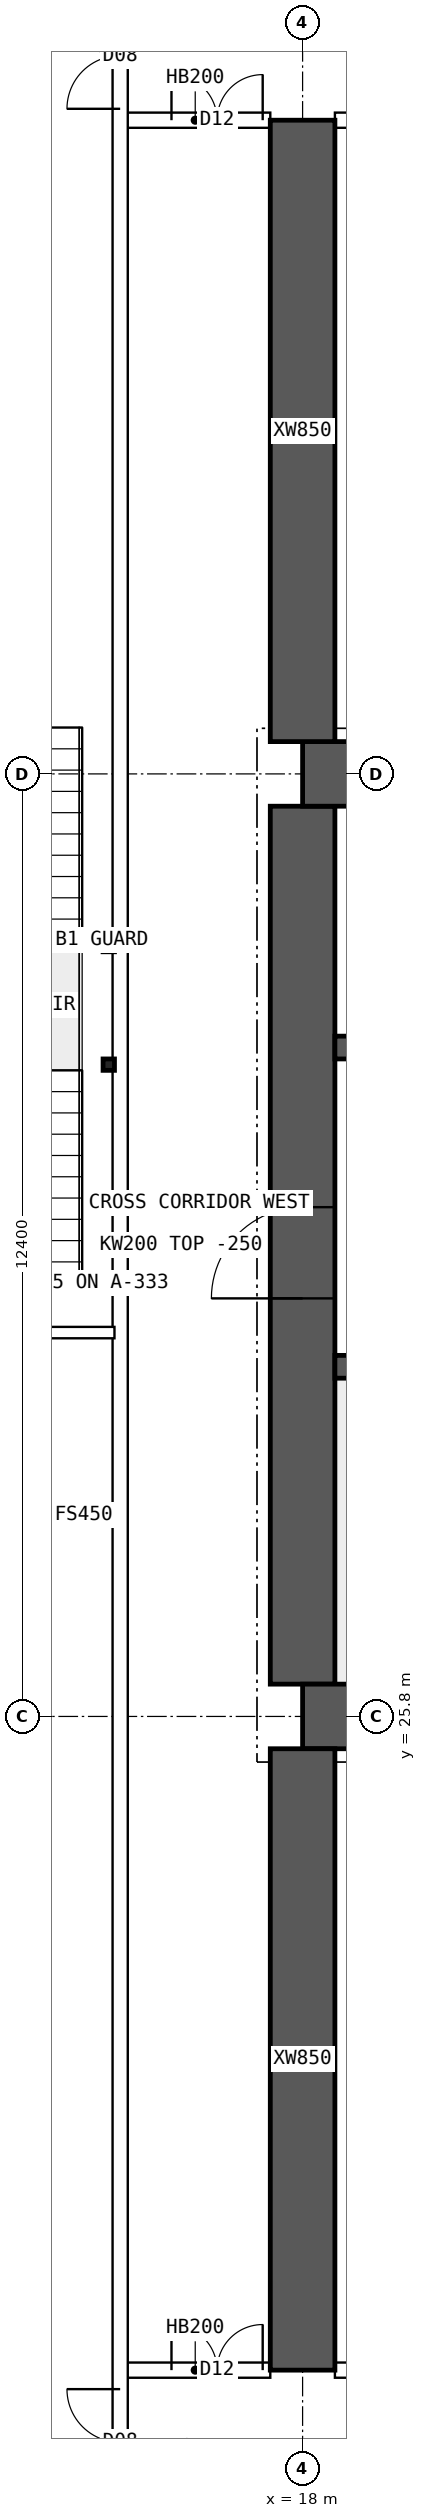
"""IFC4 building model, lengths in metres.
Left out: names, types, materials, properties, quantities, classifications, styles, units other than length and angle.
Written with IfcOpenShell. Run it as: python <this file> out.ifc"""

import sys

from ifc_helpers import new_model, si_unit, direction, frame, frame_2d, origin, origin_2d, place, context, subcontext, project, spatial, polyline, rectangle, hollow_rectangle, outline, extrude, element, fill, save


model = new_model("IFC4")
c1 = context("Model", 3, precision=1e-05, world=origin(), true_north=direction((0.0, 1.0)))
c2 = subcontext(c1, "Body", "Model", "MODEL_VIEW")
j1 = project(units=[si_unit("LENGTHUNIT", "METRE"), si_unit("PLANEANGLEUNIT", "RADIAN")], contexts=[c1])
p1 = place(None, origin())
s1 = spatial("IfcSite", under=j1, at=p1, CompositionType="ELEMENT")
p2 = place(p1, origin())
s2 = spatial("IfcBuilding", under=s1, at=p2, CompositionType="ELEMENT")
p3 = place(p2, frame((0.0, 0.0, 178.6)))
s3 = spatial("IfcBuildingStorey", under=s2, at=p3, CompositionType="ELEMENT", Elevation=178.6)
for number, where, z_axis, x_axis in (
    (1, (18.0, 25.8, 0.0), (0.0, 0.0, 1.0), (1.0, 0.0, 0.0)),
    (2, (18.0, 38.2, 0.0), (0.0, 0.0, 1.0), (1.0, 0.0, 0.0)),
):
    element("IfcWall", number, at=place(p3, frame(where, z_axis=z_axis, x_axis=x_axis)), inside=s3, PredefinedType="SHEAR", context=c2, shape_type="SweptSolid", body=[
        extrude(rectangle(XDim=48.0, YDim=0.85, at=frame_2d((24.0, 0.0))), origin(), (0.0, 0.0, 1.0), 3.75),
    ])
p4 = place(p3, frame((18.0, 26.225, 0.0), z_axis=(0.0, 0.0, 1.0), x_axis=(0.0, 1.0, 0.0)))
e3 = element("IfcWall", 3, at=p4, inside=s3, PredefinedType="SHEAR", context=c2, shape_type="SweptSolid", body=[
    extrude(rectangle(XDim=11.55, YDim=0.85, at=frame_2d((5.775, 0.0))), origin(), (0.0, 0.0, 1.0), 3.75),
])
p5 = place(p4, frame((5.075, 0.0, 0.0)))
e4 = element("IfcOpeningElement", 4, at=p5, cuts=e3, PredefinedType="OPENING", context=c2, shape_type="SweptSolid", body=[
    extrude(rectangle(XDim=1.2, YDim=2.1, at=frame_2d((0.6, 1.05))), frame((0.0, 0.435, 0.0), z_axis=(0.0, -1.0, 0.0), x_axis=(1.0, 0.0, 0.0)), (0.0, 0.0, 1.0), 0.87),
])
p6 = place(p3, frame((18.425, 30.4, 0.0), z_axis=(0.0, 0.0, 1.0), x_axis=(1.0, 0.0, 0.0)))
e5 = element("IfcWall", 5, at=p6, inside=s3, PredefinedType="SHEAR", context=c2, shape_type="SweptSolid", body=[
    extrude(rectangle(XDim=47.15, YDim=0.3, at=frame_2d((23.575, 0.0))), origin(), (0.0, 0.0, 1.0), 3.75),
])
p7 = place(p6, frame((0.4, 0.0, 0.0)))
e6 = element("IfcOpeningElement", 6, at=p7, cuts=e5, PredefinedType="OPENING", context=c2, shape_type="SweptSolid", body=[
    extrude(rectangle(XDim=1.0, YDim=2.1, at=frame_2d((0.5, 1.05))), frame((0.0, 0.16, 0.0), z_axis=(0.0, -1.0, 0.0), x_axis=(1.0, 0.0, 0.0)), (0.0, 0.0, 1.0), 0.32),
])
p8 = place(p6, frame((45.75, 0.0, 0.0)))
e7 = element("IfcOpeningElement", 7, at=p8, cuts=e5, PredefinedType="OPENING", context=c2, shape_type="SweptSolid", body=[
    extrude(rectangle(XDim=1.0, YDim=2.1, at=frame_2d((0.5, 1.05))), frame((0.0, 0.16, 0.0), z_axis=(0.0, -1.0, 0.0), x_axis=(1.0, 0.0, 0.0)), (0.0, 0.0, 1.0), 0.32),
])
p9 = place(p6, frame((8.325, 0.0, 0.0)))
e8 = element("IfcOpeningElement", 8, at=p9, cuts=e5, PredefinedType="OPENING", context=c2, shape_type="SweptSolid", body=[
    extrude(rectangle(XDim=1.1, YDim=2.1, at=frame_2d((0.55, 1.05))), frame((0.0, 0.16, 0.0), z_axis=(0.0, -1.0, 0.0), x_axis=(1.0, 0.0, 0.0)), (0.0, 0.0, 1.0), 0.32),
])
p10 = place(p6, frame((10.925, 0.0, 0.0)))
e9 = element("IfcOpeningElement", 9, at=p10, cuts=e5, PredefinedType="OPENING", context=c2, shape_type="SweptSolid", body=[
    extrude(rectangle(XDim=1.1, YDim=2.1, at=frame_2d((0.55, 1.05))), frame((0.0, 0.16, 0.0), z_axis=(0.0, -1.0, 0.0), x_axis=(1.0, 0.0, 0.0)), (0.0, 0.0, 1.0), 0.32),
])
p11 = place(p6, frame((13.525, 0.0, 0.0)))
e10 = element("IfcOpeningElement", 10, at=p11, cuts=e5, PredefinedType="OPENING", context=c2, shape_type="SweptSolid", body=[
    extrude(rectangle(XDim=1.1, YDim=2.1, at=frame_2d((0.55, 1.05))), frame((0.0, 0.16, 0.0), z_axis=(0.0, -1.0, 0.0), x_axis=(1.0, 0.0, 0.0)), (0.0, 0.0, 1.0), 0.32),
])
p12 = place(p6, frame((16.125, 0.0, 0.0)))
e11 = element("IfcOpeningElement", 11, at=p12, cuts=e5, PredefinedType="OPENING", context=c2, shape_type="SweptSolid", body=[
    extrude(rectangle(XDim=1.1, YDim=2.1, at=frame_2d((0.55, 1.05))), frame((0.0, 0.16, 0.0), z_axis=(0.0, -1.0, 0.0), x_axis=(1.0, 0.0, 0.0)), (0.0, 0.0, 1.0), 0.32),
])
p13 = place(p6, frame((18.9, 0.0, 0.0)))
e12 = element("IfcOpeningElement", 12, at=p13, cuts=e5, PredefinedType="OPENING", context=c2, shape_type="SweptSolid", body=[
    extrude(rectangle(XDim=0.9, YDim=2.1, at=frame_2d((0.45, 1.05))), frame((0.0, 0.16, 0.0), z_axis=(0.0, -1.0, 0.0), x_axis=(1.0, 0.0, 0.0)), (0.0, 0.0, 1.0), 0.32),
])
p14 = place(p6, frame((30.192, 0.0, 0.0)))
e13 = element("IfcOpeningElement", 13, at=p14, cuts=e5, PredefinedType="OPENING", context=c2, shape_type="SweptSolid", body=[
    extrude(rectangle(XDim=1.1, YDim=2.1, at=frame_2d((0.55, 1.05))), frame((0.0, 0.16, 0.0), z_axis=(0.0, -1.0, 0.0), x_axis=(1.0, 0.0, 0.0)), (0.0, 0.0, 1.0), 0.32),
])
p15 = place(p6, frame((33.725, 0.0, 0.0)))
e14 = element("IfcOpeningElement", 14, at=p15, cuts=e5, PredefinedType="OPENING", context=c2, shape_type="SweptSolid", body=[
    extrude(rectangle(XDim=1.1, YDim=2.1, at=frame_2d((0.55, 1.05))), frame((0.0, 0.16, 0.0), z_axis=(0.0, -1.0, 0.0), x_axis=(1.0, 0.0, 0.0)), (0.0, 0.0, 1.0), 0.32),
])
p16 = place(p6, frame((37.258, 0.0, 0.0)))
e15 = element("IfcOpeningElement", 15, at=p16, cuts=e5, PredefinedType="OPENING", context=c2, shape_type="SweptSolid", body=[
    extrude(rectangle(XDim=1.1, YDim=2.1, at=frame_2d((0.55, 1.05))), frame((0.0, 0.16, 0.0), z_axis=(0.0, -1.0, 0.0), x_axis=(1.0, 0.0, 0.0)), (0.0, 0.0, 1.0), 0.32),
])
p17 = place(p3, frame((18.425, 34.6, 0.0), z_axis=(0.0, 0.0, 1.0), x_axis=(1.0, 0.0, 0.0)))
e16 = element("IfcWall", 16, at=p17, inside=s3, PredefinedType="SHEAR", context=c2, shape_type="SweptSolid", body=[
    extrude(rectangle(XDim=47.15, YDim=0.3, at=frame_2d((23.575, 0.0))), origin(), (0.0, 0.0, 1.0), 3.75),
])
p18 = place(p17, frame((0.9, 0.0, 0.0)))
e17 = element("IfcOpeningElement", 17, at=p18, cuts=e16, PredefinedType="OPENING", context=c2, shape_type="SweptSolid", body=[
    extrude(rectangle(XDim=1.1, YDim=2.1, at=frame_2d((0.55, 1.05))), frame((0.0, 0.16, 0.0), z_axis=(0.0, -1.0, 0.0), x_axis=(1.0, 0.0, 0.0)), (0.0, 0.0, 1.0), 0.32),
])
p19 = place(p17, frame((45.15, 0.0, 0.0)))
e18 = element("IfcOpeningElement", 18, at=p19, cuts=e16, PredefinedType="OPENING", context=c2, shape_type="SweptSolid", body=[
    extrude(rectangle(XDim=1.1, YDim=2.1, at=frame_2d((0.55, 1.05))), frame((0.0, 0.16, 0.0), z_axis=(0.0, -1.0, 0.0), x_axis=(1.0, 0.0, 0.0)), (0.0, 0.0, 1.0), 0.32),
])
p20 = place(p17, frame((4.175, 0.0, 0.0)))
e19 = element("IfcOpeningElement", 19, at=p20, cuts=e16, PredefinedType="OPENING", context=c2, shape_type="SweptSolid", body=[
    extrude(rectangle(XDim=0.9, YDim=2.1, at=frame_2d((0.45, 1.05))), frame((0.0, 0.16, 0.0), z_axis=(0.0, -1.0, 0.0), x_axis=(1.0, 0.0, 0.0)), (0.0, 0.0, 1.0), 0.32),
])
p21 = place(p17, frame((42.075, 0.0, 0.0)))
e20 = element("IfcOpeningElement", 20, at=p21, cuts=e16, PredefinedType="OPENING", context=c2, shape_type="SweptSolid", body=[
    extrude(rectangle(XDim=0.9, YDim=2.1, at=frame_2d((0.45, 1.05))), frame((0.0, 0.16, 0.0), z_axis=(0.0, -1.0, 0.0), x_axis=(1.0, 0.0, 0.0)), (0.0, 0.0, 1.0), 0.32),
])
p22 = place(p17, frame((8.95, 0.0, 0.0)))
e21 = element("IfcOpeningElement", 21, at=p22, cuts=e16, PredefinedType="OPENING", context=c2, shape_type="SweptSolid", body=[
    extrude(rectangle(XDim=0.9, YDim=2.1, at=frame_2d((0.45, 1.05))), frame((0.0, 0.16, 0.0), z_axis=(0.0, -1.0, 0.0), x_axis=(1.0, 0.0, 0.0)), (0.0, 0.0, 1.0), 0.32),
])
p23 = place(p17, frame((12.924, 0.0, 0.0)))
e22 = element("IfcOpeningElement", 22, at=p23, cuts=e16, PredefinedType="OPENING", context=c2, shape_type="SweptSolid", body=[
    extrude(rectangle(XDim=0.9, YDim=2.1, at=frame_2d((0.45, 1.05))), frame((0.0, 0.16, 0.0), z_axis=(0.0, -1.0, 0.0), x_axis=(1.0, 0.0, 0.0)), (0.0, 0.0, 1.0), 0.32),
])
p24 = place(p17, frame((16.571, 0.0, 0.0)))
e23 = element("IfcOpeningElement", 23, at=p24, cuts=e16, PredefinedType="OPENING", context=c2, shape_type="SweptSolid", body=[
    extrude(rectangle(XDim=0.9, YDim=2.1, at=frame_2d((0.45, 1.05))), frame((0.0, 0.16, 0.0), z_axis=(0.0, -1.0, 0.0), x_axis=(1.0, 0.0, 0.0)), (0.0, 0.0, 1.0), 0.32),
])
p25 = place(p17, frame((20.33, 0.0, 0.0)))
e24 = element("IfcOpeningElement", 24, at=p25, cuts=e16, PredefinedType="OPENING", context=c2, shape_type="SweptSolid", body=[
    extrude(rectangle(XDim=0.9, YDim=2.1, at=frame_2d((0.45, 1.05))), frame((0.0, 0.16, 0.0), z_axis=(0.0, -1.0, 0.0), x_axis=(1.0, 0.0, 0.0)), (0.0, 0.0, 1.0), 0.32),
])
p26 = place(p17, frame((24.736, 0.0, 0.0)))
e25 = element("IfcOpeningElement", 25, at=p26, cuts=e16, PredefinedType="OPENING", context=c2, shape_type="SweptSolid", body=[
    extrude(rectangle(XDim=0.9, YDim=2.1, at=frame_2d((0.45, 1.05))), frame((0.0, 0.16, 0.0), z_axis=(0.0, -1.0, 0.0), x_axis=(1.0, 0.0, 0.0)), (0.0, 0.0, 1.0), 0.32),
])
p27 = place(p17, frame((27.533, 0.0, 0.0)))
e26 = element("IfcOpeningElement", 26, at=p27, cuts=e16, PredefinedType="OPENING", context=c2, shape_type="SweptSolid", body=[
    extrude(rectangle(XDim=0.9, YDim=2.1, at=frame_2d((0.45, 1.05))), frame((0.0, 0.16, 0.0), z_axis=(0.0, -1.0, 0.0), x_axis=(1.0, 0.0, 0.0)), (0.0, 0.0, 1.0), 0.32),
])
p28 = place(p17, frame((33.654, 0.0, 0.0)))
e27 = element("IfcOpeningElement", 27, at=p28, cuts=e16, PredefinedType="OPENING", context=c2, shape_type="SweptSolid", body=[
    extrude(rectangle(XDim=0.9, YDim=2.1, at=frame_2d((0.45, 1.05))), frame((0.0, 0.16, 0.0), z_axis=(0.0, -1.0, 0.0), x_axis=(1.0, 0.0, 0.0)), (0.0, 0.0, 1.0), 0.32),
])
for number, where, z_axis, x_axis in (
    (28, (18.0, 17.2, 0.0), (0.0, 0.0, 1.0), (0.0, 1.0, 0.0)),
    (29, (18.0, 38.625, 0.0), (0.0, 0.0, 1.0), (0.0, 1.0, 0.0)),
):
    element("IfcWall", number, at=place(p3, frame(where, z_axis=z_axis, x_axis=x_axis)), inside=s3, PredefinedType="SHEAR", context=c2, shape_type="SweptSolid", body=[
        extrude(rectangle(XDim=8.175, YDim=0.85, at=frame_2d((4.087, 0.0))), origin(), (0.0, 0.0, 1.0), 3.75),
    ])
p29 = place(p3, frame((15.6, 17.2, 0.0), z_axis=(0.0, 0.0, 1.0), x_axis=(1.0, 0.0, 0.0)))
e30 = element("IfcWall", 30, at=p29, inside=s3, PredefinedType="SOLIDWALL", context=c2, shape_type="SweptSolid", body=[
    extrude(rectangle(XDim=1.975, YDim=0.2, at=frame_2d((0.987, 0.0))), origin(), (0.0, 0.0, 1.0), 3.5),
])
p30 = place(p29, frame((0.675, 0.0, 0.0)))
e31 = element("IfcOpeningElement", 31, at=p30, cuts=e30, PredefinedType="OPENING", context=c2, shape_type="SweptSolid", body=[
    extrude(rectangle(XDim=1.2, YDim=2.1, at=frame_2d((0.6, 1.05))), frame((0.0, 0.11, 0.0), z_axis=(0.0, -1.0, 0.0), x_axis=(1.0, 0.0, 0.0)), (0.0, 0.0, 1.0), 0.22),
])
p31 = place(p3, frame((18.425, 17.2, 0.0), z_axis=(0.0, 0.0, 1.0), x_axis=(1.0, 0.0, 0.0)))
e32 = element("IfcWall", 32, at=p31, inside=s3, PredefinedType="SOLIDWALL", context=c2, shape_type="SweptSolid", body=[
    extrude(rectangle(XDim=5.15, YDim=0.2, at=frame_2d((2.575, 0.0))), origin(), (0.0, 0.0, 1.0), 3.5),
])
p32 = place(p31, frame((0.8, 0.0, 0.0)))
e33 = element("IfcOpeningElement", 33, at=p32, cuts=e32, PredefinedType="OPENING", context=c2, shape_type="SweptSolid", body=[
    extrude(rectangle(XDim=1.0, YDim=2.1, at=frame_2d((0.5, 1.05))), frame((0.0, 0.11, 0.0), z_axis=(0.0, -1.0, 0.0), x_axis=(1.0, 0.0, 0.0)), (0.0, 0.0, 1.0), 0.22),
])
p33 = place(p3, frame((15.6, 46.8, 0.0), z_axis=(0.0, 0.0, 1.0), x_axis=(1.0, 0.0, 0.0)))
e34 = element("IfcWall", 34, at=p33, inside=s3, PredefinedType="SOLIDWALL", context=c2, shape_type="SweptSolid", body=[
    extrude(rectangle(XDim=1.975, YDim=0.2, at=frame_2d((0.987, 0.0))), origin(), (0.0, 0.0, 1.0), 3.5),
])
p34 = place(p33, frame((0.675, 0.0, 0.0)))
e35 = element("IfcOpeningElement", 35, at=p34, cuts=e34, PredefinedType="OPENING", context=c2, shape_type="SweptSolid", body=[
    extrude(rectangle(XDim=1.2, YDim=2.1, at=frame_2d((0.6, 1.05))), frame((0.0, 0.11, 0.0), z_axis=(0.0, -1.0, 0.0), x_axis=(1.0, 0.0, 0.0)), (0.0, 0.0, 1.0), 0.22),
])
p35 = place(p3, frame((18.425, 46.8, 0.0), z_axis=(0.0, 0.0, 1.0), x_axis=(1.0, 0.0, 0.0)))
e36 = element("IfcWall", 36, at=p35, inside=s3, PredefinedType="SOLIDWALL", context=c2, shape_type="SweptSolid", body=[
    extrude(rectangle(XDim=5.15, YDim=0.2, at=frame_2d((2.575, 0.0))), origin(), (0.0, 0.0, 1.0), 3.5),
])
p36 = place(p35, frame((0.8, 0.0, 0.0)))
e37 = element("IfcOpeningElement", 37, at=p36, cuts=e36, PredefinedType="OPENING", context=c2, shape_type="SweptSolid", body=[
    extrude(rectangle(XDim=1.0, YDim=2.1, at=frame_2d((0.5, 1.05))), frame((0.0, 0.11, 0.0), z_axis=(0.0, -1.0, 0.0), x_axis=(1.0, 0.0, 0.0)), (0.0, 0.0, 1.0), 0.22),
])
p37 = place(p3, frame((8.705, 30.85, 0.0), z_axis=(0.0, 0.0, 1.0), x_axis=(1.0, 0.0, 0.0)))
e38 = element("IfcWall", 38, at=p37, inside=s3, PredefinedType="PARTITIONING", context=c2, shape_type="SweptSolid", body=[
    extrude(outline(polyline([(0.0, 0.0), (6.82, 0.0), (6.82, 3.5), (3.597, 3.5), (3.595, 3.05), (2.997, 3.05), (2.995, 3.5), (0.0, 3.5), (0.0, 0.0)])), frame((0.0, 0.075, 0.0), z_axis=(0.0, -1.0, 0.0), x_axis=(1.0, 0.0, 0.0)), (0.0, 0.0, 1.0), 0.15),
])
p38 = place(p3, frame((15.6, 10.446, 0.0), z_axis=(0.0, 0.0, 1.0), x_axis=(0.0, 1.0, 0.0)))
e39 = element("IfcWall", 39, at=p38, inside=s3, PredefinedType="SOLIDWALL", context=c2, shape_type="SweptSolid", body=[
    extrude(rectangle(XDim=43.107, YDim=0.2, at=frame_2d((21.554, 0.0))), origin(), (0.0, 0.0, 1.0), 3.5),
])
p39 = place(p38, frame((5.104, 0.0, 0.0)))
e40 = element("IfcOpeningElement", 40, at=p39, cuts=e39, PredefinedType="OPENING", context=c2, shape_type="SweptSolid", body=[
    extrude(rectangle(XDim=1.4, YDim=2.1, at=frame_2d((0.7, 1.05))), frame((0.0, 0.11, 0.0), z_axis=(0.0, -1.0, 0.0), x_axis=(1.0, 0.0, 0.0)), (0.0, 0.0, 1.0), 0.22),
])
p40 = place(p38, frame((36.504, 0.0, 0.0)))
e41 = element("IfcOpeningElement", 41, at=p40, cuts=e39, PredefinedType="OPENING", context=c2, shape_type="SweptSolid", body=[
    extrude(rectangle(XDim=1.4, YDim=2.1, at=frame_2d((0.7, 1.05))), frame((0.0, 0.11, 0.0), z_axis=(0.0, -1.0, 0.0), x_axis=(1.0, 0.0, 0.0)), (0.0, 0.0, 1.0), 0.22),
])
for number, where, z_axis, x_axis in (
    (42, (15.45, 34.375, 0.0), (0.0, 0.0, 1.0), (1.0, 0.0, 0.0)),
    (43, (15.45, 35.935, 0.0), (0.0, 0.0, 1.0), (1.0, 0.0, 0.0)),
):
    element("IfcColumn", number, at=place(p3, frame(where, z_axis=z_axis, x_axis=x_axis)), inside=s3, PredefinedType="COLUMN", context=c2, shape_type="SweptSolid", body=[
        extrude(hollow_rectangle(XDim=0.15, YDim=0.15, WallThickness=0.008, at=origin_2d()), origin(), (0.0, 0.0, 1.0), 3.5),
    ])
p41 = place(p5, origin())
e44 = element("IfcDoor", 44, at=p41, inside=s3, OperationType="SINGLE_SWING_LEFT", PredefinedType="DOOR", context=c2, shape_type="SweptSolid", body=[
    extrude(rectangle(XDim=1.2, YDim=2.1, at=frame_2d((0.6, 1.05))), frame((0.0, 0.025, 0.0), z_axis=(0.0, -1.0, 0.0), x_axis=(1.0, 0.0, 0.0)), (0.0, 0.0, 1.0), 0.05),
])
fill(e4, e44)
p42 = place(p30, origin())
e45 = element("IfcDoor", 45, at=p42, inside=s3, OperationType="DOUBLE_DOOR_SINGLE_SWING", PredefinedType="DOOR", context=c2, shape_type="SweptSolid", body=[
    extrude(rectangle(XDim=1.2, YDim=2.1, at=frame_2d((0.6, 1.05))), frame((0.0, 0.025, 0.0), z_axis=(0.0, -1.0, 0.0), x_axis=(1.0, 0.0, 0.0)), (0.0, 0.0, 1.0), 0.05),
])
fill(e31, e45)
p43 = place(p34, origin())
e46 = element("IfcDoor", 46, at=p43, inside=s3, OperationType="DOUBLE_DOOR_SINGLE_SWING", PredefinedType="DOOR", context=c2, shape_type="SweptSolid", body=[
    extrude(rectangle(XDim=1.2, YDim=2.1, at=frame_2d((0.6, 1.05))), frame((0.0, 0.025, 0.0), z_axis=(0.0, -1.0, 0.0), x_axis=(1.0, 0.0, 0.0)), (0.0, 0.0, 1.0), 0.05),
])
fill(e35, e46)
p44 = place(p39, origin())
e47 = element("IfcDoor", 47, at=p44, inside=s3, OperationType="DOUBLE_DOOR_SINGLE_SWING", PredefinedType="DOOR", context=c2, shape_type="SweptSolid", body=[
    extrude(rectangle(XDim=1.4, YDim=2.1, at=frame_2d((0.7, 1.05))), frame((0.0, 0.025, 0.0), z_axis=(0.0, -1.0, 0.0), x_axis=(1.0, 0.0, 0.0)), (0.0, 0.0, 1.0), 0.05),
])
fill(e40, e47)
p45 = place(p40, origin())
e48 = element("IfcDoor", 48, at=p45, inside=s3, OperationType="DOUBLE_DOOR_SINGLE_SWING", PredefinedType="DOOR", context=c2, shape_type="SweptSolid", body=[
    extrude(rectangle(XDim=1.4, YDim=2.1, at=frame_2d((0.7, 1.05))), frame((0.0, 0.025, 0.0), z_axis=(0.0, -1.0, 0.0), x_axis=(1.0, 0.0, 0.0)), (0.0, 0.0, 1.0), 0.05),
])
fill(e41, e48)
save(model, sys.argv[1])
